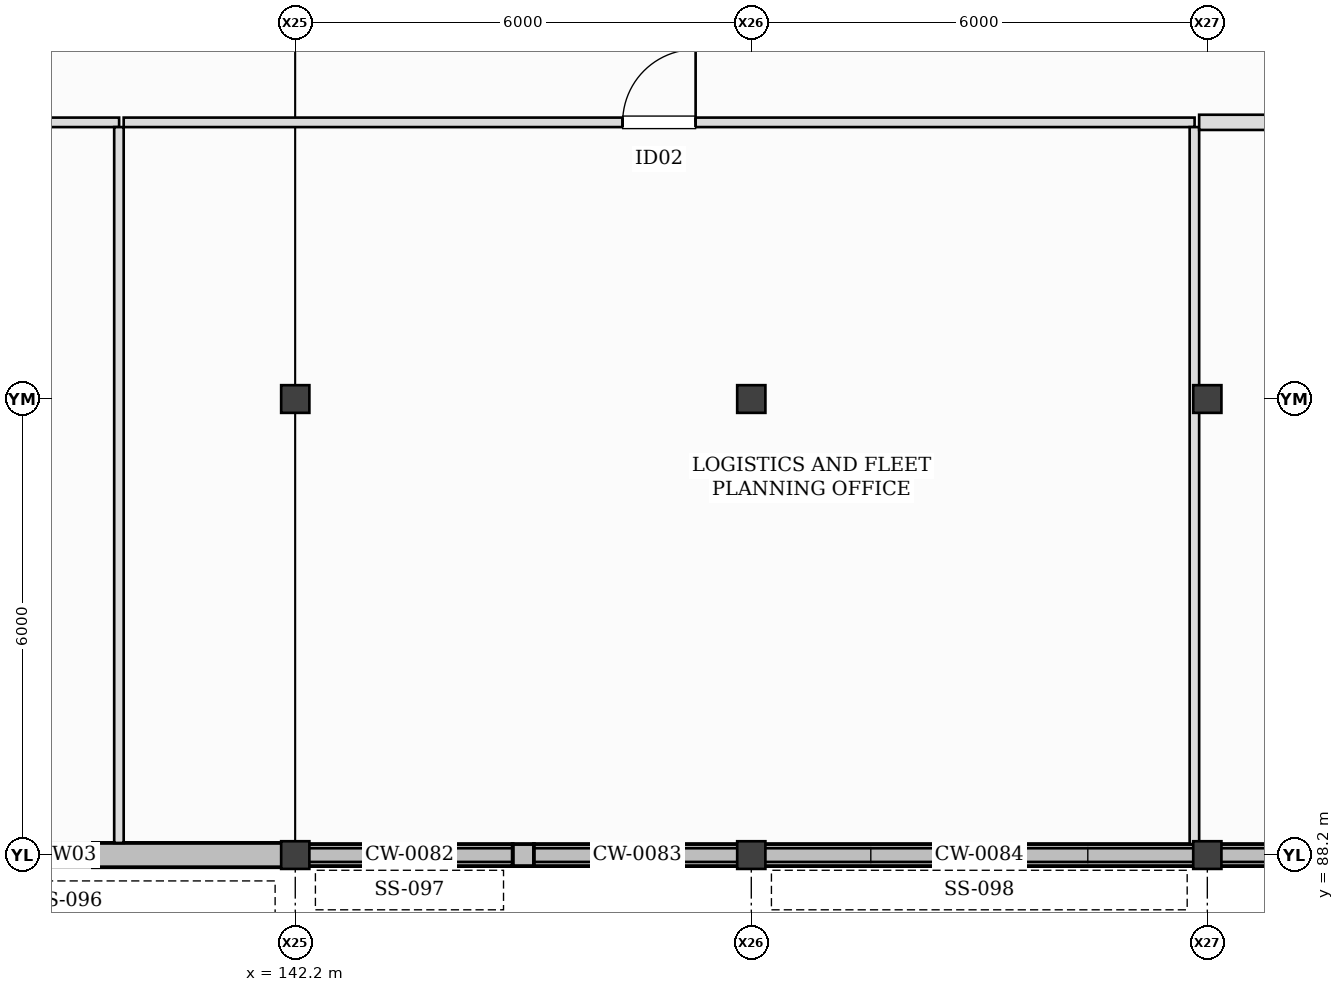
"""IFC4 building model, lengths in metres.
Left out: names, types, materials, properties, quantities, classifications, styles, units other than length and angle.
Written with IfcOpenShell. Run it as: python <this file> out.ifc"""

import sys

from ifc_helpers import new_model, si_unit, direction, frame, frame_2d, origin, origin_2d, place, context, subcontext, project, spatial, rectangle, i_section, extrude, element, fill, save


model = new_model("IFC4")
c1 = context("Model", 3, precision=1e-05, world=origin(), true_north=direction((0.0, 1.0)))
c2 = subcontext(c1, "Body", "Model", "MODEL_VIEW")
j1 = project(units=[si_unit("LENGTHUNIT", "METRE"), si_unit("PLANEANGLEUNIT", "RADIAN")], contexts=[c1])
p1 = place(None, origin())
s1 = spatial("IfcSite", under=j1, at=p1, CompositionType="ELEMENT")
p2 = place(p1, origin())
s2 = spatial("IfcBuilding", under=s1, at=p2, CompositionType="ELEMENT")
p3 = place(p2, frame((0.0, 0.0, 6.0)))
s3 = spatial("IfcBuildingStorey", under=s2, at=p3, CompositionType="ELEMENT", Elevation=6.0)
for number, where, z_axis, x_axis in (
    (1, (142.2, 88.2, 0.0), (0.0, 0.0, 1.0), (1.0, 0.0, 0.0)),
    (2, (142.2, 94.2, 0.0), (0.0, 0.0, 1.0), (1.0, 0.0, 0.0)),
    (3, (148.2, 88.2, 0.0), (0.0, 0.0, 1.0), (1.0, 0.0, 0.0)),
    (4, (148.2, 94.2, 0.0), (0.0, 0.0, 1.0), (1.0, 0.0, 0.0)),
    (5, (154.2, 88.2, 0.0), (0.0, 0.0, 1.0), (1.0, 0.0, 0.0)),
    (6, (154.2, 94.2, 0.0), (0.0, 0.0, 1.0), (1.0, 0.0, 0.0)),
):
    element("IfcColumn", number, at=place(p3, frame(where, z_axis=z_axis, x_axis=x_axis)), inside=s3, PredefinedType="COLUMN", context=c2, shape_type="SweptSolid", body=[
        extrude(i_section(OverallWidth=0.371, OverallDepth=0.364, WebThickness=0.013, FlangeThickness=0.022, at=origin_2d()), origin(), (0.0, 0.0, 1.0), 4.0),
    ])
p4 = place(p3, frame((136.345, 88.2, 0.0), z_axis=(0.0, 0.0, 1.0), x_axis=(1.0, 0.0, 0.0)))
e7 = element("IfcWall", 7, at=p4, inside=s3, PredefinedType="STANDARD", context=c2, shape_type="SweptSolid", body=[
    extrude(rectangle(XDim=5.71, YDim=0.32, at=frame_2d((2.855, 0.0))), origin(), (0.0, 0.0, 1.0), 3.153),
])
p5 = place(p4, frame((1.193, 0.0, 1.0)))
e8 = element("IfcOpeningElement", 8, at=p5, cuts=e7, PredefinedType="OPENING", context=c2, shape_type="SweptSolid", body=[
    extrude(rectangle(XDim=2.0, YDim=1.36, at=frame_2d((1.0, 0.68))), frame((0.0, 0.17, 0.0), z_axis=(0.0, -1.0, 0.0), x_axis=(1.0, 0.0, 0.0)), (0.0, 0.0, 1.0), 0.34),
])
p6 = place(p3, frame((145.06, 88.2, 0.0), z_axis=(0.0, 0.0, 1.0), x_axis=(1.0, 0.0, 0.0)))
e9 = element("IfcWall", 9, at=p6, inside=s3, PredefinedType="STANDARD", context=c2, shape_type="SweptSolid", body=[
    extrude(rectangle(XDim=0.28, YDim=0.29, at=frame_2d((0.14, 0.0))), origin(), (0.0, 0.0, 1.0), 3.153),
])
p7 = place(p3, frame((142.345, 88.2, 0.0), z_axis=(0.0, 0.0, 1.0), x_axis=(1.0, 0.0, 0.0)))
e10 = element("IfcWall", 10, at=p7, inside=s3, PredefinedType="STANDARD", context=c2, shape_type="SweptSolid", body=[
    extrude(rectangle(XDim=2.715, YDim=0.29, at=frame_2d((1.357, 0.0))), origin(), (0.0, 0.0, 1.0), 0.32),
])
p8 = place(p3, frame((145.34, 88.2, 0.0), z_axis=(0.0, 0.0, 1.0), x_axis=(1.0, 0.0, 0.0)))
e11 = element("IfcWall", 11, at=p8, inside=s3, PredefinedType="STANDARD", context=c2, shape_type="SweptSolid", body=[
    extrude(rectangle(XDim=2.715, YDim=0.29, at=frame_2d((1.357, 0.0))), origin(), (0.0, 0.0, 1.0), 0.44),
])
p9 = place(p3, frame((148.345, 88.2, 0.0), z_axis=(0.0, 0.0, 1.0), x_axis=(1.0, 0.0, 0.0)))
e12 = element("IfcWall", 12, at=p9, inside=s3, PredefinedType="STANDARD", context=c2, shape_type="SweptSolid", body=[
    extrude(rectangle(XDim=5.71, YDim=0.29, at=frame_2d((2.855, 0.0))), origin(), (0.0, 0.0, 1.0), 0.56),
])
p10 = place(p3, frame((154.345, 88.2, 0.0), z_axis=(0.0, 0.0, 1.0), x_axis=(1.0, 0.0, 0.0)))
e13 = element("IfcWall", 13, at=p10, inside=s3, PredefinedType="STANDARD", context=c2, shape_type="SweptSolid", body=[
    extrude(rectangle(XDim=2.715, YDim=0.29, at=frame_2d((1.357, 0.0))), origin(), (0.0, 0.0, 1.0), 0.68),
])
p11 = place(p3, frame((124.345, 97.84, 0.0), z_axis=(0.0, 0.0, 1.0), x_axis=(1.0, 0.0, 0.0)))
e14 = element("IfcWall", 14, at=p11, inside=s3, PredefinedType="PARTITIONING", context=c2, shape_type="SweptSolid", body=[
    extrude(rectangle(XDim=15.538, YDim=0.125, at=frame_2d((7.769, 0.0))), origin(), (0.0, 0.0, 1.0), 3.72),
])
p12 = place(p11, frame((7.254, 0.0, 0.0)))
e15 = element("IfcOpeningElement", 15, at=p12, cuts=e14, PredefinedType="OPENING", context=c2, shape_type="SweptSolid", body=[
    extrude(rectangle(XDim=1.03, YDim=2.15, at=frame_2d((0.515, 1.075))), frame((0.0, 0.073, 0.0), z_axis=(0.0, -1.0, 0.0), x_axis=(1.0, 0.0, 0.0)), (0.0, 0.0, 1.0), 0.145),
])
p13 = place(p3, frame((139.88, 97.778, 0.0), z_axis=(0.0, 0.0, 1.0), x_axis=(0.0, -1.0, 0.0)))
e16 = element("IfcWall", 16, at=p13, inside=s3, PredefinedType="PARTITIONING", context=c2, shape_type="SweptSolid", body=[
    extrude(rectangle(XDim=9.417, YDim=0.125, at=frame_2d((4.709, 0.0))), origin(), (0.0, 0.0, 1.0), 3.289),
])
p14 = place(p3, frame((139.942, 97.84, 0.0), z_axis=(0.0, 0.0, 1.0), x_axis=(1.0, 0.0, 0.0)))
e17 = element("IfcWall", 17, at=p14, inside=s3, PredefinedType="PARTITIONING", context=c2, shape_type="SweptSolid", body=[
    extrude(rectangle(XDim=14.09, YDim=0.125, at=frame_2d((7.045, 0.0))), origin(), (0.0, 0.0, 1.0), 3.72),
])
p15 = place(p14, frame((6.565, 0.0, 0.0)))
e18 = element("IfcOpeningElement", 18, at=p15, cuts=e17, PredefinedType="OPENING", context=c2, shape_type="SweptSolid", body=[
    extrude(rectangle(XDim=0.96, YDim=2.15, at=frame_2d((0.48, 1.075))), frame((0.0, 0.073, 0.0), z_axis=(0.0, -1.0, 0.0), x_axis=(1.0, 0.0, 0.0)), (0.0, 0.0, 1.0), 0.145),
])
p16 = place(p3, frame((154.03, 97.778, 0.0), z_axis=(0.0, 0.0, 1.0), x_axis=(0.0, -1.0, 0.0)))
e19 = element("IfcWall", 19, at=p16, inside=s3, PredefinedType="PARTITIONING", context=c2, shape_type="SweptSolid", body=[
    extrude(rectangle(XDim=9.433, YDim=0.125, at=frame_2d((4.716, 0.0))), origin(), (0.0, 0.0, 1.0), 3.157),
])
p17 = place(p3, frame((154.093, 97.84, 0.0), z_axis=(0.0, 0.0, 1.0), x_axis=(1.0, 0.0, 0.0)))
e20 = element("IfcWall", 20, at=p17, inside=s3, PredefinedType="PARTITIONING", context=c2, shape_type="SweptSolid", body=[
    extrude(rectangle(XDim=11.962, YDim=0.2, at=frame_2d((5.981, 0.0))), origin(), (0.0, 0.0, 1.0), 3.72),
])
p18 = place(p17, frame((5.251, 0.0, 0.0)))
e21 = element("IfcOpeningElement", 21, at=p18, cuts=e20, PredefinedType="OPENING", context=c2, shape_type="SweptSolid", body=[
    extrude(rectangle(XDim=1.46, YDim=2.3, at=frame_2d((0.73, 1.15))), frame((0.0, 0.11, 0.0), z_axis=(0.0, -1.0, 0.0), x_axis=(1.0, 0.0, 0.0)), (0.0, 0.0, 1.0), 0.22),
])
p19 = place(p5, origin())
e22 = element("IfcWindow", 22, at=p19, inside=s3, PartitioningType="SINGLE_PANEL", PredefinedType="WINDOW", context=c2, shape_type="SweptSolid", body=[
    extrude(rectangle(XDim=2.0, YDim=1.36, at=frame_2d((1.0, 0.68))), frame((0.0, 0.03, 0.0), z_axis=(0.0, -1.0, 0.0), x_axis=(1.0, 0.0, 0.0)), (0.0, 0.0, 1.0), 0.06),
])
fill(e8, e22)
p20 = place(p15, frame((0.96, 0.0, 0.0), z_axis=(0.0, 0.0, 1.0), x_axis=(-1.0, 0.0, 0.0)))
e23 = element("IfcDoor", 23, at=p20, inside=s3, OperationType="SINGLE_SWING_RIGHT", PredefinedType="DOOR", context=c2, shape_type="SweptSolid", body=[
    extrude(rectangle(XDim=0.96, YDim=2.15, at=frame_2d((0.48, 1.075))), frame((0.0, 0.025, 0.0), z_axis=(0.0, -1.0, 0.0), x_axis=(1.0, 0.0, 0.0)), (0.0, 0.0, 1.0), 0.05),
])
fill(e18, e23)
save(model, sys.argv[1])
